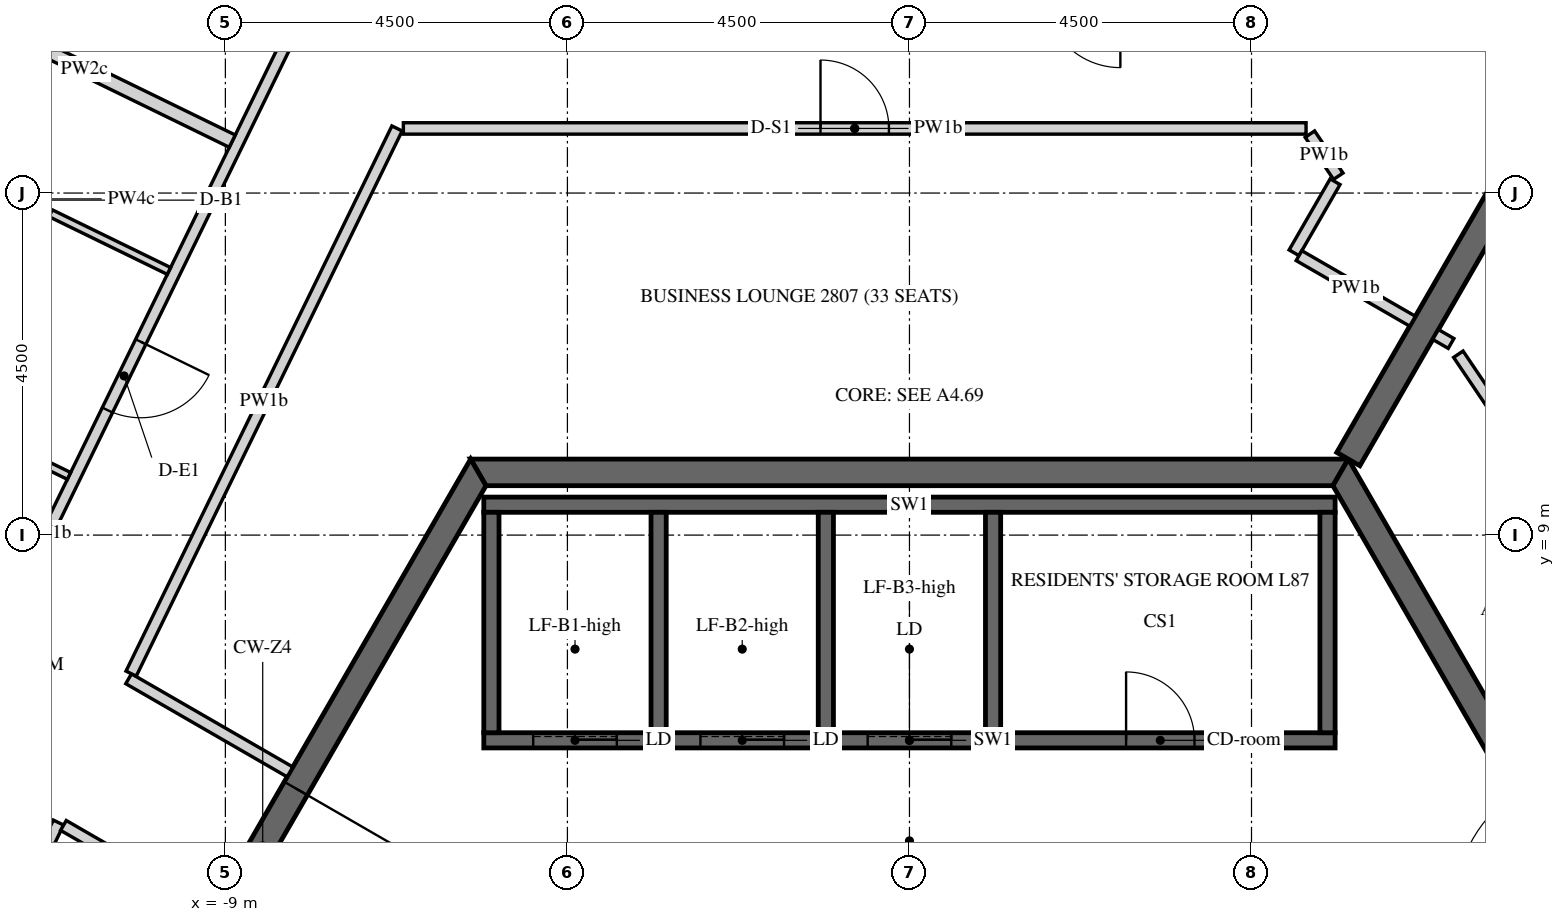
"""IFC4 building model, lengths in metres.
Left out: names, types, materials, properties, quantities, classifications, styles, units other than length and angle.
Written with IfcOpenShell. Run it as: python <this file> out.ifc"""

import sys

from ifc_helpers import new_model, si_unit, direction, frame, frame_2d, origin, place, context, subcontext, project, spatial, polyline, rectangle, outline, extrude, element, fill, save


model = new_model("IFC4")
c1 = context("Model", 3, precision=1e-05, world=origin(), true_north=direction((0.0, 1.0)))
c2 = subcontext(c1, "Body", "Model", "MODEL_VIEW")
j1 = project(units=[si_unit("LENGTHUNIT", "METRE"), si_unit("PLANEANGLEUNIT", "RADIAN")], contexts=[c1])
p1 = place(None, origin())
s1 = spatial("IfcSite", under=j1, at=p1, CompositionType="ELEMENT")
p2 = place(p1, origin())
s2 = spatial("IfcBuilding", under=s1, at=p2, CompositionType="ELEMENT")
p3 = place(p2, frame((0.0, 0.0, 361.2)))
s3 = spatial("IfcBuildingStorey", under=s2, at=p3, CompositionType="ELEMENT", Elevation=361.2)
p4 = place(p3, frame((-5.673, 9.825, -0.15), z_axis=(0.0, 0.0, 1.0), x_axis=(-0.499995046907, -0.866028263435, 0.0)))
e1 = element("IfcWall", 1, at=p4, inside=s3, PredefinedType="SHEAR", context=c2, shape_type="SweptSolid", body=[
    extrude(outline(polyline([(-0.101, -0.175), (11.446, -0.175), (11.244, 0.175), (0.101, 0.175), (-0.101, -0.175)])), origin(), (0.0, 0.0, 1.0), 3.9),
])
p5 = place(p4, frame((4.801, 0.0, 0.15)))
e2 = element("IfcOpeningElement", 2, at=p5, cuts=e1, PredefinedType="OPENING", context=c2, shape_type="SweptSolid", body=[
    extrude(rectangle(XDim=1.8, YDim=2.4, at=frame_2d((0.9, 1.2))), frame((0.0, 0.185, 0.0), z_axis=(0.0, -1.0, 0.0), x_axis=(1.0, 0.0, 0.0)), (0.0, 0.0, 1.0), 0.37),
])
p6 = place(p3, frame((11.345, 0.0, -0.15), z_axis=(0.0, 0.0, 1.0), x_axis=(-0.499995046907, 0.866028263435, 0.0)))
e3 = element("IfcWall", 3, at=p6, inside=s3, PredefinedType="SHEAR", context=c2, shape_type="SweptSolid", body=[
    extrude(outline(polyline([(-0.101, -0.175), (11.446, -0.175), (11.244, 0.175), (0.101, 0.175), (-0.101, -0.175)])), origin(), (0.0, 0.0, 1.0), 3.9),
])
p7 = place(p6, frame((4.744, 0.0, 0.15)))
e4 = element("IfcOpeningElement", 4, at=p7, cuts=e3, PredefinedType="OPENING", context=c2, shape_type="SweptSolid", body=[
    extrude(rectangle(XDim=1.8, YDim=2.4, at=frame_2d((0.9, 1.2))), frame((0.0, 0.185, 0.0), z_axis=(0.0, -1.0, 0.0), x_axis=(1.0, 0.0, 0.0)), (0.0, 0.0, 1.0), 0.37),
])
p8 = place(p3, frame((5.673, 9.825, -0.15), z_axis=(0.0, 0.0, 1.0), x_axis=(-1.0, 0.0, 0.0)))
e5 = element("IfcWall", 5, at=p8, inside=s3, PredefinedType="SHEAR", context=c2, shape_type="SweptSolid", body=[
    extrude(outline(polyline([(-0.101, -0.175), (11.446, -0.175), (11.244, 0.175), (0.101, 0.175), (-0.101, -0.175)])), origin(), (0.0, 0.0, 1.0), 3.9),
])
p9 = place(p3, frame((5.773, 10.0, -0.15), z_axis=(0.0, 0.0, 1.0), x_axis=(0.500007911273, 0.866020836161, 0.0)))
e6 = element("IfcWall", 6, at=p9, inside=s3, PredefinedType="SHEAR", context=c2, shape_type="SweptSolid", body=[
    extrude(rectangle(XDim=14.51, YDim=0.35, at=frame_2d((7.255, 0.0))), origin(), (0.0, 0.0, 1.0), 3.9),
])
p10 = place(p9, frame((6.355, 0.0, 0.15)))
e7 = element("IfcOpeningElement", 7, at=p10, cuts=e6, PredefinedType="OPENING", context=c2, shape_type="SweptSolid", body=[
    extrude(rectangle(XDim=1.8, YDim=2.4, at=frame_2d((0.9, 1.2))), frame((0.0, 0.185, 0.0), z_axis=(0.0, -1.0, 0.0), x_axis=(1.0, 0.0, 0.0)), (0.0, 0.0, 1.0), 0.37),
])
p11 = place(p3, frame((-5.6, 6.3, -0.25), z_axis=(0.0, 0.0, 1.0), x_axis=(1.0, 0.0, 0.0)))
e8 = element("IfcWall", 8, at=p11, inside=s3, PredefinedType="SHEAR", context=c2, shape_type="SweptSolid", body=[
    extrude(rectangle(XDim=11.2, YDim=0.2, at=frame_2d((5.6, 0.0))), origin(), (0.0, 0.0, 1.0), 3.9),
])
p12 = place(p11, frame((8.45, 0.0, 0.25)))
e9 = element("IfcOpeningElement", 9, at=p12, cuts=e8, PredefinedType="OPENING", context=c2, shape_type="SweptSolid", body=[
    extrude(rectangle(XDim=0.9, YDim=2.1, at=frame_2d((0.45, 1.05))), frame((0.0, 0.11, 0.0), z_axis=(0.0, -1.0, 0.0), x_axis=(1.0, 0.0, 0.0)), (0.0, 0.0, 1.0), 0.22),
])
p13 = place(p11, frame((0.65, 0.0, 0.25)))
e10 = element("IfcOpeningElement", 10, at=p13, cuts=e8, PredefinedType="OPENING", context=c2, shape_type="SweptSolid", body=[
    extrude(rectangle(XDim=1.1, YDim=2.1, at=frame_2d((0.55, 1.05))), frame((0.0, 0.11, 0.0), z_axis=(0.0, -1.0, 0.0), x_axis=(1.0, 0.0, 0.0)), (0.0, 0.0, 1.0), 0.22),
])
p14 = place(p11, frame((2.85, 0.0, 0.25)))
e11 = element("IfcOpeningElement", 11, at=p14, cuts=e8, PredefinedType="OPENING", context=c2, shape_type="SweptSolid", body=[
    extrude(rectangle(XDim=1.1, YDim=2.1, at=frame_2d((0.55, 1.05))), frame((0.0, 0.11, 0.0), z_axis=(0.0, -1.0, 0.0), x_axis=(1.0, 0.0, 0.0)), (0.0, 0.0, 1.0), 0.22),
])
p15 = place(p11, frame((5.05, 0.0, 0.25)))
e12 = element("IfcOpeningElement", 12, at=p15, cuts=e8, PredefinedType="OPENING", context=c2, shape_type="SweptSolid", body=[
    extrude(rectangle(XDim=1.1, YDim=2.1, at=frame_2d((0.55, 1.05))), frame((0.0, 0.11, 0.0), z_axis=(0.0, -1.0, 0.0), x_axis=(1.0, 0.0, 0.0)), (0.0, 0.0, 1.0), 0.22),
])
p16 = place(p3, frame((-5.6, 9.4, -0.25), z_axis=(0.0, 0.0, 1.0), x_axis=(1.0, 0.0, 0.0)))
e13 = element("IfcWall", 13, at=p16, inside=s3, PredefinedType="SHEAR", context=c2, shape_type="SweptSolid", body=[
    extrude(rectangle(XDim=11.2, YDim=0.2, at=frame_2d((5.6, 0.0))), origin(), (0.0, 0.0, 1.0), 3.9),
])
for number, where, z_axis, x_axis in (
    (14, (-5.5, 6.4, -0.25), (0.0, 0.0, 1.0), (0.0, 1.0, 0.0)),
    (15, (-3.3, 6.4, -0.25), (0.0, 0.0, 1.0), (0.0, 1.0, 0.0)),
    (16, (-1.1, 6.4, -0.25), (0.0, 0.0, 1.0), (0.0, 1.0, 0.0)),
    (17, (1.1, 6.4, -0.25), (0.0, 0.0, 1.0), (0.0, 1.0, 0.0)),
    (18, (5.5, 6.4, -0.25), (0.0, 0.0, 1.0), (0.0, 1.0, 0.0)),
):
    element("IfcWall", number, at=place(p3, frame(where, z_axis=z_axis, x_axis=x_axis)), inside=s3, PredefinedType="SHEAR", context=c2, shape_type="SweptSolid", body=[
        extrude(rectangle(XDim=2.9, YDim=0.2, at=frame_2d((1.45, 0.0))), origin(), (0.0, 0.0, 1.0), 3.9),
    ])
p17 = place(p3, frame((-7.903, 16.075, 0.0), z_axis=(0.0, 0.0, 1.0), x_axis=(-0.438364761272, -0.898797160696, 0.0)))
e19 = element("IfcWall", 19, at=p17, inside=s3, PredefinedType="PARTITIONING", context=c2, shape_type="SweptSolid", body=[
    extrude(rectangle(XDim=15.688, YDim=0.15, at=frame_2d((7.844, 0.0))), origin(), (0.0, 0.0, 1.0), 2.82),
])
p18 = place(p17, frame((5.042, 0.0, 0.0)))
e20 = element("IfcOpeningElement", 20, at=p18, cuts=e19, PredefinedType="OPENING", context=c2, shape_type="SweptSolid", body=[
    extrude(rectangle(XDim=1.0, YDim=2.1, at=frame_2d((0.5, 1.05))), frame((0.0, 0.085, 0.0), z_axis=(0.0, -1.0, 0.0), x_axis=(1.0, 0.0, 0.0)), (0.0, 0.0, 1.0), 0.17),
])
p19 = place(p3, frame((-13.466, 0.564, 0.0), z_axis=(0.0, 0.0, 1.0), x_axis=(0.438366040624, 0.898796536724, 0.0)))
e21 = element("IfcWall", 21, at=p19, inside=s3, PredefinedType="PARTITIONING", context=c2, shape_type="SweptSolid", body=[
    extrude(rectangle(XDim=5.178, YDim=0.15, at=frame_2d((2.589, 0.0))), origin(), (0.0, 0.0, 1.0), 2.82),
])
p20 = place(p3, frame((-11.131, 5.18, 0.0), z_axis=(0.0, 0.0, 1.0), x_axis=(0.866037886895, -0.499978377995, 0.0)))
e22 = element("IfcWall", 22, at=p20, inside=s3, PredefinedType="PARTITIONING", context=c2, shape_type="SweptSolid", body=[
    extrude(rectangle(XDim=2.229, YDim=0.15, at=frame_2d((1.115, 0.0))), origin(), (0.0, 0.0, 1.0), 2.82),
])
p21 = place(p3, frame((-8.15, 5.884, 0.0), z_axis=(0.0, 0.0, 1.0), x_axis=(-0.866009790468, 0.500027042082, 0.0)))
e23 = element("IfcWall", 23, at=p21, inside=s3, PredefinedType="PARTITIONING", context=c2, shape_type="SweptSolid", body=[
    extrude(rectangle(XDim=2.451, YDim=0.15, at=frame_2d((1.226, 0.0))), origin(), (0.0, 0.0, 1.0), 2.82),
])
p22 = place(p3, frame((-10.24, 7.178, 0.0), z_axis=(0.0, 0.0, 1.0), x_axis=(0.438356120288, 0.898801375058, 0.0)))
e24 = element("IfcWall", 24, at=p22, inside=s3, PredefinedType="PARTITIONING", context=c2, shape_type="SweptSolid", body=[
    extrude(rectangle(XDim=7.98, YDim=0.15, at=frame_2d((3.99, 0.0))), origin(), (0.0, 0.0, 1.0), 2.82),
])
p23 = place(p3, frame((-6.658, 14.35, 0.0), z_axis=(0.0, 0.0, 1.0), x_axis=(1.0, 0.0, 0.0)))
e25 = element("IfcWall", 25, at=p23, inside=s3, PredefinedType="PARTITIONING", context=c2, shape_type="SweptSolid", body=[
    extrude(rectangle(XDim=11.876, YDim=0.15, at=frame_2d((5.938, 0.0))), origin(), (0.0, 0.0, 1.0), 2.82),
])
p24 = place(p23, frame((5.488, 0.0, 0.0)))
e26 = element("IfcOpeningElement", 26, at=p24, cuts=e25, PredefinedType="OPENING", context=c2, shape_type="SweptSolid", body=[
    extrude(rectangle(XDim=0.9, YDim=2.1, at=frame_2d((0.45, 1.05))), frame((0.0, 0.085, 0.0), z_axis=(0.0, -1.0, 0.0), x_axis=(1.0, 0.0, 0.0)), (0.0, 0.0, 1.0), 0.17),
])
p25 = place(p3, frame((5.268, 14.275, 0.0), z_axis=(0.0, 0.0, 1.0), x_axis=(0.559416337009, -0.828886820915, 0.0)))
e27 = element("IfcWall", 27, at=p25, inside=s3, PredefinedType="PARTITIONING", context=c2, shape_type="SweptSolid", body=[
    extrude(rectangle(XDim=0.668, YDim=0.15, at=frame_2d((0.334, 0.0))), origin(), (0.0, 0.0, 1.0), 2.82),
])
p26 = place(p3, frame((5.6, 13.649, 0.0), z_axis=(0.0, 0.0, 1.0), x_axis=(-0.500126914667, -0.865952117167, 0.0)))
e28 = element("IfcWall", 28, at=p26, inside=s3, PredefinedType="PARTITIONING", context=c2, shape_type="SweptSolid", body=[
    extrude(rectangle(XDim=1.08, YDim=0.15, at=frame_2d((0.54, 0.0))), origin(), (0.0, 0.0, 1.0), 2.82),
])
p27 = place(p3, frame((5.125, 12.677, 0.0), z_axis=(0.0, 0.0, 1.0), x_axis=(0.866013532718, -0.500020560727, 0.0)))
e29 = element("IfcWall", 29, at=p27, inside=s3, PredefinedType="PARTITIONING", context=c2, shape_type="SweptSolid", body=[
    extrude(rectangle(XDim=1.725, YDim=0.15, at=frame_2d((0.863, 0.0))), origin(), (0.0, 0.0, 1.0), 2.82),
])
p28 = place(p3, frame((6.922, 11.639, 0.0), z_axis=(0.0, 0.0, 1.0), x_axis=(0.866254745882, -0.499602557277, 0.0)))
e30 = element("IfcWall", 30, at=p28, inside=s3, PredefinedType="PARTITIONING", context=c2, shape_type="SweptSolid", body=[
    extrude(rectangle(XDim=0.235, YDim=0.15, at=frame_2d((0.118, 0.0))), origin(), (0.0, 0.0, 1.0), 2.82),
])
p29 = place(p3, frame((7.221, 11.38, 0.0), z_axis=(0.0, 0.0, 1.0), x_axis=(0.559200548931, -0.829032415576, 0.0)))
e31 = element("IfcWall", 31, at=p29, inside=s3, PredefinedType="PARTITIONING", context=c2, shape_type="SweptSolid", body=[
    extrude(rectangle(XDim=5.236, YDim=0.15, at=frame_2d((2.618, 0.0))), origin(), (0.0, 0.0, 1.0), 2.82),
])
p30 = place(p29, frame((2.168, 0.0, 0.0)))
e32 = element("IfcOpeningElement", 32, at=p30, cuts=e31, PredefinedType="OPENING", context=c2, shape_type="SweptSolid", body=[
    extrude(rectangle(XDim=0.9, YDim=2.1, at=frame_2d((0.45, 1.05))), frame((0.0, 0.085, 0.0), z_axis=(0.0, -1.0, 0.0), x_axis=(1.0, 0.0, 0.0)), (0.0, 0.0, 1.0), 0.17),
])
p31 = place(p3, frame((-12.797, 16.079, 0.0), z_axis=(0.0, 0.0, 1.0), x_axis=(0.898786890582, -0.438385817879, 0.0)))
e33 = element("IfcWall", 33, at=p31, inside=s3, PredefinedType="PARTITIONING", context=c2, shape_type="SweptSolid", body=[
    extrude(rectangle(XDim=4.325, YDim=0.18, at=frame_2d((2.163, 0.0))), origin(), (0.0, 0.0, 1.0), 2.82),
])
p32 = place(p3, frame((-9.742, 12.475, 0.0), z_axis=(0.0, 0.0, 1.0), x_axis=(-0.898786890582, 0.438385817879, 0.0)))
e34 = element("IfcWall", 34, at=p32, inside=s3, PredefinedType="PARTITIONING", context=c2, shape_type="SweptSolid", body=[
    extrude(rectangle(XDim=4.325, YDim=0.1, at=frame_2d((2.163, 0.0))), origin(), (0.0, 0.0, 1.0), 2.82),
])
p33 = place(p32, frame((1.725, 0.0, 0.0)))
e35 = element("IfcOpeningElement", 35, at=p33, cuts=e34, PredefinedType="OPENING", context=c2, shape_type="SweptSolid", body=[
    extrude(rectangle(XDim=0.8, YDim=2.1, at=frame_2d((0.4, 1.05))), frame((0.0, 0.06, 0.0), z_axis=(0.0, -1.0, 0.0), x_axis=(1.0, 0.0, 0.0)), (0.0, 0.0, 1.0), 0.12),
])
p34 = place(p3, frame((-14.9, 11.653, 0.0), z_axis=(0.0, 0.0, 1.0), x_axis=(0.898792594469, -0.438374123469, 0.0)))
e36 = element("IfcWall", 36, at=p34, inside=s3, PredefinedType="PARTITIONING", context=c2, shape_type="SweptSolid", body=[
    extrude(rectangle(XDim=4.275, YDim=0.1, at=frame_2d((2.137, 0.0))), origin(), (0.0, 0.0, 1.0), 2.82),
])
p35 = place(p34, frame((1.75, 0.0, 0.0)))
e37 = element("IfcOpeningElement", 37, at=p35, cuts=e36, PredefinedType="OPENING", context=c2, shape_type="SweptSolid", body=[
    extrude(rectangle(XDim=0.8, YDim=2.1, at=frame_2d((0.4, 1.05))), frame((0.0, 0.06, 0.0), z_axis=(0.0, -1.0, 0.0), x_axis=(1.0, 0.0, 0.0)), (0.0, 0.0, 1.0), 0.12),
])
p36 = place(p5, origin())
e38 = element("IfcDoor", 38, at=p36, inside=s3, OperationType="DOUBLE_DOOR_SINGLE_SWING", PredefinedType="DOOR", context=c2, shape_type="SweptSolid", body=[
    extrude(rectangle(XDim=1.8, YDim=2.4, at=frame_2d((0.9, 1.2))), frame((0.0, 0.025, 0.0), z_axis=(0.0, -1.0, 0.0), x_axis=(1.0, 0.0, 0.0)), (0.0, 0.0, 1.0), 0.05),
])
fill(e2, e38)
p37 = place(p12, origin())
e39 = element("IfcDoor", 39, at=p37, inside=s3, OperationType="SINGLE_SWING_LEFT", PredefinedType="DOOR", context=c2, shape_type="SweptSolid", body=[
    extrude(rectangle(XDim=0.9, YDim=2.1, at=frame_2d((0.45, 1.05))), frame((0.0, 0.025, 0.0), z_axis=(0.0, -1.0, 0.0), x_axis=(1.0, 0.0, 0.0)), (0.0, 0.0, 1.0), 0.05),
])
fill(e9, e39)
p38 = place(p13, origin())
e40 = element("IfcDoor", 40, at=p38, inside=s3, OperationType="SLIDING_TO_LEFT", PredefinedType="DOOR", context=c2, shape_type="SweptSolid", body=[
    extrude(rectangle(XDim=1.1, YDim=2.1, at=frame_2d((0.55, 1.05))), frame((0.0, 0.025, 0.0), z_axis=(0.0, -1.0, 0.0), x_axis=(1.0, 0.0, 0.0)), (0.0, 0.0, 1.0), 0.05),
])
fill(e10, e40)
p39 = place(p14, origin())
e41 = element("IfcDoor", 41, at=p39, inside=s3, OperationType="SLIDING_TO_LEFT", PredefinedType="DOOR", context=c2, shape_type="SweptSolid", body=[
    extrude(rectangle(XDim=1.1, YDim=2.1, at=frame_2d((0.55, 1.05))), frame((0.0, 0.025, 0.0), z_axis=(0.0, -1.0, 0.0), x_axis=(1.0, 0.0, 0.0)), (0.0, 0.0, 1.0), 0.05),
])
fill(e11, e41)
p40 = place(p15, origin())
e42 = element("IfcDoor", 42, at=p40, inside=s3, OperationType="SLIDING_TO_LEFT", PredefinedType="DOOR", context=c2, shape_type="SweptSolid", body=[
    extrude(rectangle(XDim=1.1, YDim=2.1, at=frame_2d((0.55, 1.05))), frame((0.0, 0.025, 0.0), z_axis=(0.0, -1.0, 0.0), x_axis=(1.0, 0.0, 0.0)), (0.0, 0.0, 1.0), 0.05),
])
fill(e12, e42)
p41 = place(p18, origin())
e43 = element("IfcDoor", 43, at=p41, inside=s3, OperationType="SINGLE_SWING_LEFT", PredefinedType="DOOR", context=c2, shape_type="SweptSolid", body=[
    extrude(rectangle(XDim=1.0, YDim=2.1, at=frame_2d((0.5, 1.05))), frame((0.0, 0.025, 0.0), z_axis=(0.0, -1.0, 0.0), x_axis=(1.0, 0.0, 0.0)), (0.0, 0.0, 1.0), 0.05),
])
fill(e20, e43)
p42 = place(p24, origin())
e44 = element("IfcDoor", 44, at=p42, inside=s3, OperationType="SINGLE_SWING_RIGHT", PredefinedType="DOOR", context=c2, shape_type="SweptSolid", body=[
    extrude(rectangle(XDim=0.9, YDim=2.1, at=frame_2d((0.45, 1.05))), frame((0.0, 0.025, 0.0), z_axis=(0.0, -1.0, 0.0), x_axis=(1.0, 0.0, 0.0)), (0.0, 0.0, 1.0), 0.05),
])
fill(e26, e44)
save(model, sys.argv[1])
